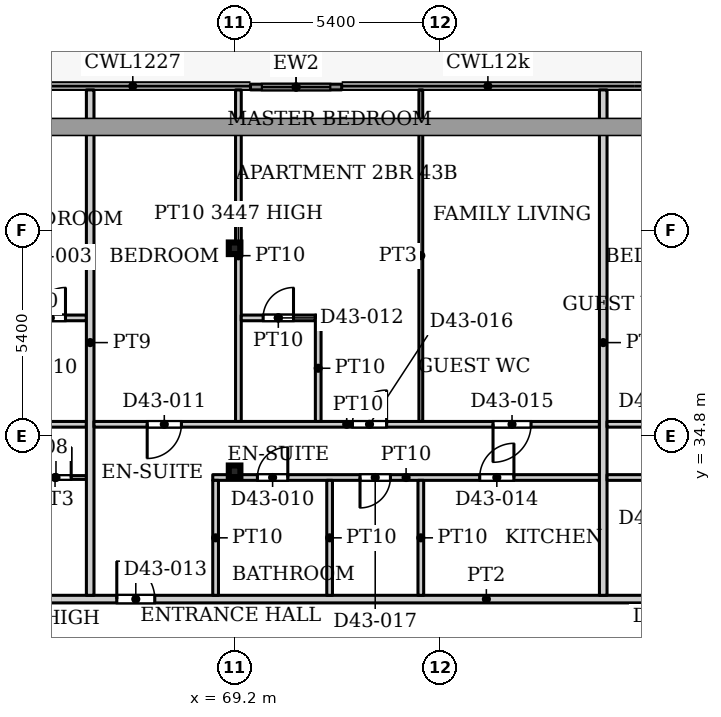
"""IFC4 building model, lengths in metres.
Left out: names, types, materials, properties, quantities, classifications, styles, units other than length and angle.
Written with IfcOpenShell. Run it as: python <this file> out.ifc"""

import sys

from ifc_helpers import new_model, si_unit, direction, frame, frame_2d, origin, origin_2d, place, context, subcontext, project, spatial, rectangle, hollow_rectangle, extrude, source, transform, mapped, element, fill, save


model = new_model("IFC4")
c1 = context("Model", 3, precision=1e-05, world=origin(), true_north=direction((0.0, 1.0)))
c2 = subcontext(c1, "Body", "Model", "MODEL_VIEW")
j1 = project(units=[si_unit("LENGTHUNIT", "METRE"), si_unit("PLANEANGLEUNIT", "RADIAN")], contexts=[c1])
p1 = place(None, origin())
s1 = spatial("IfcSite", under=j1, at=p1, CompositionType="ELEMENT")
p2 = place(p1, origin())
s2 = spatial("IfcBuilding", under=s1, at=p2, CompositionType="ELEMENT")
p3 = place(p2, frame((0.0, 0.0, 183.8)))
s3 = spatial("IfcBuildingStorey", under=s2, at=p3, CompositionType="ELEMENT", Elevation=183.8)
for number, where, z_axis, x_axis in (
    (1, (69.2, 33.863, 0.0), (0.0, 0.0, 1.0), (1.0, 0.0, 0.0)),
    (2, (69.2, 39.732, 0.0), (0.0, 0.0, 1.0), (1.0, 0.0, 0.0)),
):
    element("IfcColumn", number, at=place(p3, frame(where, z_axis=z_axis, x_axis=x_axis)), inside=s3, PredefinedType="COLUMN", context=c2, shape_type="SweptSolid", body=[
        extrude(hollow_rectangle(XDim=0.305, YDim=0.305, WallThickness=0.016, InnerFilletRadius=0.016, OuterFilletRadius=0.032, at=origin_2d()), origin(), (0.0, 0.0, 1.0), 3.9),
    ])
p4 = place(p3, frame((69.618, 43.975, 0.0), z_axis=(0.0, 0.0, 1.0), x_axis=(1.0, 0.0, 0.0)))
e3 = element("IfcWall", 3, at=p4, inside=s3, PredefinedType="SOLIDWALL", context=c2, shape_type="SweptSolid", body=[
    extrude(rectangle(XDim=2.4, YDim=0.15, at=frame_2d((1.2, 0.0))), origin(), (0.0, 0.0, 1.0), 3.75),
])
p5 = place(p4, frame((0.3, 0.0, 0.0)))
e4 = element("IfcOpeningElement", 4, at=p5, cuts=e3, PredefinedType="OPENING", context=c2, shape_type="SweptSolid", body=[
    extrude(rectangle(XDim=1.8, YDim=2.4, at=frame_2d((0.9, 1.2))), frame((0.0, 0.085, 0.0), z_axis=(0.0, -1.0, 0.0), x_axis=(1.0, 0.0, 0.0)), (0.0, 0.0, 1.0), 0.17),
])
p6 = place(p3, frame((53.549, 30.5, 0.0), z_axis=(0.0, 0.0, 1.0), x_axis=(1.0, 0.0, 0.0)))
e5 = element("IfcWall", 5, at=p6, inside=s3, PredefinedType="PARTITIONING", context=c2, shape_type="SweptSolid", body=[
    extrude(rectangle(XDim=44.551, YDim=0.2, at=frame_2d((22.275, 0.0))), origin(), (0.0, 0.0, 1.0), 3.6),
])
p7 = place(p6, frame((8.351, 0.0, 0.0)))
e6 = element("IfcOpeningElement", 6, at=p7, cuts=e5, PredefinedType="OPENING", context=c2, shape_type="SweptSolid", body=[
    extrude(rectangle(XDim=1.0, YDim=2.1, at=frame_2d((0.5, 1.05))), frame((0.0, 0.11, 0.0), z_axis=(0.0, -1.0, 0.0), x_axis=(1.0, 0.0, 0.0)), (0.0, 0.0, 1.0), 0.22),
])
p8 = place(p6, frame((12.551, 0.0, 0.0)))
e7 = element("IfcOpeningElement", 7, at=p8, cuts=e5, PredefinedType="OPENING", context=c2, shape_type="SweptSolid", body=[
    extrude(rectangle(XDim=1.0, YDim=2.1, at=frame_2d((0.5, 1.05))), frame((0.0, 0.11, 0.0), z_axis=(0.0, -1.0, 0.0), x_axis=(1.0, 0.0, 0.0)), (0.0, 0.0, 1.0), 0.22),
])
p9 = place(p6, frame((28.751, 0.0, 0.0)))
e8 = element("IfcOpeningElement", 8, at=p9, cuts=e5, PredefinedType="OPENING", context=c2, shape_type="SweptSolid", body=[
    extrude(rectangle(XDim=1.0, YDim=2.1, at=frame_2d((0.5, 1.05))), frame((0.0, 0.11, 0.0), z_axis=(0.0, -1.0, 0.0), x_axis=(1.0, 0.0, 0.0)), (0.0, 0.0, 1.0), 0.22),
])
p10 = place(p6, frame((40.751, 0.0, 0.0)))
e9 = element("IfcOpeningElement", 9, at=p10, cuts=e5, PredefinedType="OPENING", context=c2, shape_type="SweptSolid", body=[
    extrude(rectangle(XDim=1.0, YDim=2.1, at=frame_2d((0.5, 1.05))), frame((0.0, 0.11, 0.0), z_axis=(0.0, -1.0, 0.0), x_axis=(1.0, 0.0, 0.0)), (0.0, 0.0, 1.0), 0.22),
])
p11 = place(p3, frame((53.549, 35.1, 0.0), z_axis=(0.0, 0.0, 1.0), x_axis=(1.0, 0.0, 0.0)))
e10 = element("IfcWall", 10, at=p11, inside=s3, PredefinedType="PARTITIONING", context=c2, shape_type="SweptSolid", body=[
    extrude(rectangle(XDim=11.751, YDim=0.15, at=frame_2d((5.875, 0.0))), origin(), (0.0, 0.0, 1.0), 3.6),
])
p12 = place(p11, frame((5.551, 0.0, 0.0)))
e11 = element("IfcOpeningElement", 11, at=p12, cuts=e10, PredefinedType="OPENING", context=c2, shape_type="SweptSolid", body=[
    extrude(rectangle(XDim=0.9, YDim=2.1, at=frame_2d((0.45, 1.05))), frame((0.0, 0.085, 0.0), z_axis=(0.0, -1.0, 0.0), x_axis=(1.0, 0.0, 0.0)), (0.0, 0.0, 1.0), 0.17),
])
p13 = place(p11, frame((1.751, 0.0, 0.0)))
e12 = element("IfcOpeningElement", 12, at=p13, cuts=e10, PredefinedType="OPENING", context=c2, shape_type="SweptSolid", body=[
    extrude(rectangle(XDim=1.0, YDim=2.1, at=frame_2d((0.5, 1.05))), frame((0.0, 0.085, 0.0), z_axis=(0.0, -1.0, 0.0), x_axis=(1.0, 0.0, 0.0)), (0.0, 0.0, 1.0), 0.17),
])
p14 = place(p11, frame((8.101, 0.0, 0.0)))
e13 = element("IfcOpeningElement", 13, at=p14, cuts=e10, PredefinedType="OPENING", context=c2, shape_type="SweptSolid", body=[
    extrude(rectangle(XDim=0.9, YDim=2.1, at=frame_2d((0.45, 1.05))), frame((0.0, 0.085, 0.0), z_axis=(0.0, -1.0, 0.0), x_axis=(1.0, 0.0, 0.0)), (0.0, 0.0, 1.0), 0.17),
])
p15 = place(p3, frame((63.375, 37.9, 0.0), z_axis=(0.0, 0.0, 1.0), x_axis=(1.0, 0.0, 0.0)))
e14 = element("IfcWall", 14, at=p15, inside=s3, PredefinedType="PARTITIONING", context=c2, shape_type="SweptSolid", body=[
    extrude(rectangle(XDim=1.925, YDim=0.15, at=frame_2d((0.962, 0.0))), origin(), (0.0, 0.0, 1.0), 3.6),
])
p16 = place(p15, frame((0.575, 0.0, 0.0)))
e15 = element("IfcOpeningElement", 15, at=p16, cuts=e14, PredefinedType="OPENING", context=c2, shape_type="SweptSolid", body=[
    extrude(rectangle(XDim=0.8, YDim=2.1, at=frame_2d((0.4, 1.05))), frame((0.0, 0.085, 0.0), z_axis=(0.0, -1.0, 0.0), x_axis=(1.0, 0.0, 0.0)), (0.0, 0.0, 1.0), 0.17),
])
p17 = place(p3, frame((63.65, 33.7, 0.0), z_axis=(0.0, 0.0, 1.0), x_axis=(1.0, 0.0, 0.0)))
e16 = element("IfcWall", 16, at=p17, inside=s3, PredefinedType="PARTITIONING", context=c2, shape_type="SweptSolid", body=[
    extrude(rectangle(XDim=1.65, YDim=0.1, at=frame_2d((0.825, 0.0))), origin(), (0.0, 0.0, 1.0), 3.6),
])
p18 = place(p17, frame((0.45, 0.0, 0.0)))
e17 = element("IfcOpeningElement", 17, at=p18, cuts=e16, PredefinedType="OPENING", context=c2, shape_type="SweptSolid", body=[
    extrude(rectangle(XDim=0.8, YDim=2.1, at=frame_2d((0.4, 1.05))), frame((0.0, 0.06, 0.0), z_axis=(0.0, -1.0, 0.0), x_axis=(1.0, 0.0, 0.0)), (0.0, 0.0, 1.0), 0.12),
])
p19 = place(p3, frame((65.4, 30.6, 0.0), z_axis=(0.0, 0.0, 1.0), x_axis=(0.0, 1.0, 0.0)))
e18 = element("IfcWall", 18, at=p19, inside=s3, PredefinedType="PARTITIONING", context=c2, shape_type="SweptSolid", body=[
    extrude(rectangle(XDim=13.3, YDim=0.2, at=frame_2d((6.65, 0.0))), origin(), (0.0, 0.0, 1.0), 3.6),
])
p20 = place(p3, frame((65.5, 35.1, 0.0), z_axis=(0.0, 0.0, 1.0), x_axis=(1.0, 0.0, 0.0)))
e19 = element("IfcWall", 19, at=p20, inside=s3, PredefinedType="PARTITIONING", context=c2, shape_type="SweptSolid", body=[
    extrude(rectangle(XDim=13.3, YDim=0.15, at=frame_2d((6.65, 0.0))), origin(), (0.0, 0.0, 1.0), 3.6),
])
p21 = place(p20, frame((1.4, 0.0, 0.0)))
e20 = element("IfcOpeningElement", 20, at=p21, cuts=e19, PredefinedType="OPENING", context=c2, shape_type="SweptSolid", body=[
    extrude(rectangle(XDim=0.9, YDim=2.1, at=frame_2d((0.45, 1.05))), frame((0.0, 0.085, 0.0), z_axis=(0.0, -1.0, 0.0), x_axis=(1.0, 0.0, 0.0)), (0.0, 0.0, 1.0), 0.17),
])
p22 = place(p20, frame((10.5, 0.0, 0.0)))
e21 = element("IfcOpeningElement", 21, at=p22, cuts=e19, PredefinedType="OPENING", context=c2, shape_type="SweptSolid", body=[
    extrude(rectangle(XDim=1.0, YDim=2.1, at=frame_2d((0.5, 1.05))), frame((0.0, 0.085, 0.0), z_axis=(0.0, -1.0, 0.0), x_axis=(1.0, 0.0, 0.0)), (0.0, 0.0, 1.0), 0.17),
])
p23 = place(p20, frame((6.8, 0.0, 0.0)))
e22 = element("IfcOpeningElement", 22, at=p23, cuts=e19, PredefinedType="OPENING", context=c2, shape_type="SweptSolid", body=[
    extrude(rectangle(XDim=0.9, YDim=2.1, at=frame_2d((0.45, 1.05))), frame((0.0, 0.085, 0.0), z_axis=(0.0, -1.0, 0.0), x_axis=(1.0, 0.0, 0.0)), (0.0, 0.0, 1.0), 0.17),
])
p24 = place(p3, frame((68.625, 33.7, 0.0), z_axis=(0.0, 0.0, 1.0), x_axis=(1.0, 0.0, 0.0)))
e23 = element("IfcWall", 23, at=p24, inside=s3, PredefinedType="PARTITIONING", context=c2, shape_type="SweptSolid", body=[
    extrude(rectangle(XDim=10.175, YDim=0.15, at=frame_2d((5.087, 0.0))), origin(), (0.0, 0.0, 1.0), 3.6),
])
p25 = place(p24, frame((1.175, 0.0, 0.0)))
e24 = element("IfcOpeningElement", 24, at=p25, cuts=e23, PredefinedType="OPENING", context=c2, shape_type="SweptSolid", body=[
    extrude(rectangle(XDim=0.8, YDim=2.1, at=frame_2d((0.4, 1.05))), frame((0.0, 0.085, 0.0), z_axis=(0.0, -1.0, 0.0), x_axis=(1.0, 0.0, 0.0)), (0.0, 0.0, 1.0), 0.17),
])
p26 = place(p24, frame((7.025, 0.0, 0.0)))
e25 = element("IfcOpeningElement", 25, at=p26, cuts=e23, PredefinedType="OPENING", context=c2, shape_type="SweptSolid", body=[
    extrude(rectangle(XDim=0.9, YDim=2.1, at=frame_2d((0.45, 1.05))), frame((0.0, 0.085, 0.0), z_axis=(0.0, -1.0, 0.0), x_axis=(1.0, 0.0, 0.0)), (0.0, 0.0, 1.0), 0.17),
])
p27 = place(p24, frame((3.875, 0.0, 0.0)))
e26 = element("IfcOpeningElement", 26, at=p27, cuts=e23, PredefinedType="OPENING", context=c2, shape_type="SweptSolid", body=[
    extrude(rectangle(XDim=0.8, YDim=2.1, at=frame_2d((0.4, 1.05))), frame((0.0, 0.085, 0.0), z_axis=(0.0, -1.0, 0.0), x_axis=(1.0, 0.0, 0.0)), (0.0, 0.0, 1.0), 0.17),
])
p28 = place(p3, frame((68.7, 30.6, 0.0), z_axis=(0.0, 0.0, 1.0), x_axis=(0.0, 1.0, 0.0)))
e27 = element("IfcWall", 27, at=p28, inside=s3, PredefinedType="PARTITIONING", context=c2, shape_type="SweptSolid", body=[
    extrude(rectangle(XDim=3.025, YDim=0.15, at=frame_2d((1.512, 0.0))), origin(), (0.0, 0.0, 1.0), 3.6),
])
p29 = place(p3, frame((69.3, 35.175, 0.0), z_axis=(0.0, 0.0, 1.0), x_axis=(0.0, 1.0, 0.0)))
e28 = element("IfcWall", 28, at=p29, inside=s3, PredefinedType="PARTITIONING", context=c2, shape_type="SweptSolid", body=[
    extrude(rectangle(XDim=8.725, YDim=0.15, at=frame_2d((4.362, 0.0))), origin(), (0.0, 0.0, 1.0), 3.447),
])
p30 = place(p3, frame((69.375, 37.9, 0.0), z_axis=(0.0, 0.0, 1.0), x_axis=(1.0, 0.0, 0.0)))
e29 = element("IfcWall", 29, at=p30, inside=s3, PredefinedType="PARTITIONING", context=c2, shape_type="SweptSolid", body=[
    extrude(rectangle(XDim=1.95, YDim=0.15, at=frame_2d((0.975, 0.0))), origin(), (0.0, 0.0, 1.0), 3.6),
])
p31 = place(p30, frame((0.575, 0.0, 0.0)))
e30 = element("IfcOpeningElement", 30, at=p31, cuts=e29, PredefinedType="OPENING", context=c2, shape_type="SweptSolid", body=[
    extrude(rectangle(XDim=0.8, YDim=2.1, at=frame_2d((0.4, 1.05))), frame((0.0, 0.085, 0.0), z_axis=(0.0, -1.0, 0.0), x_axis=(1.0, 0.0, 0.0)), (0.0, 0.0, 1.0), 0.17),
])
p32 = place(p3, frame((71.4, 35.175, 0.0), z_axis=(0.0, 0.0, 1.0), x_axis=(0.0, 1.0, 0.0)))
e31 = element("IfcWall", 31, at=p32, inside=s3, PredefinedType="PARTITIONING", context=c2, shape_type="SweptSolid", body=[
    extrude(rectangle(XDim=2.8, YDim=0.15, at=frame_2d((1.4, 0.0))), origin(), (0.0, 0.0, 1.0), 3.6),
])
for number, where, z_axis, x_axis in (
    (32, (71.7, 30.6, 0.0), (0.0, 0.0, 1.0), (0.0, 1.0, 0.0)),
    (33, (74.1, 30.6, 0.0), (0.0, 0.0, 1.0), (0.0, 1.0, 0.0)),
):
    element("IfcWall", number, at=place(p3, frame(where, z_axis=z_axis, x_axis=x_axis)), inside=s3, PredefinedType="PARTITIONING", context=c2, shape_type="SweptSolid", body=[
        extrude(rectangle(XDim=3.025, YDim=0.15, at=frame_2d((1.512, 0.0))), origin(), (0.0, 0.0, 1.0), 3.6),
    ])
p33 = place(p3, frame((74.1, 35.175, 0.0), z_axis=(0.0, 0.0, 1.0), x_axis=(0.0, 1.0, 0.0)))
e34 = element("IfcWall", 34, at=p33, inside=s3, PredefinedType="PARTITIONING", context=c2, shape_type="SweptSolid", body=[
    extrude(rectangle(XDim=8.725, YDim=0.1, at=frame_2d((4.362, 0.0))), origin(), (0.0, 0.0, 1.0), 3.6),
])
p34 = place(p3, frame((78.9, 30.6, 0.0), z_axis=(0.0, 0.0, 1.0), x_axis=(0.0, 1.0, 0.0)))
e35 = element("IfcWall", 35, at=p34, inside=s3, PredefinedType="PARTITIONING", context=c2, shape_type="SweptSolid", body=[
    extrude(rectangle(XDim=13.3, YDim=0.2, at=frame_2d((6.65, 0.0))), origin(), (0.0, 0.0, 1.0), 3.6),
])
p35 = place(p3, frame((79.0, 33.7, 0.0), z_axis=(0.0, 0.0, 1.0), x_axis=(1.0, 0.0, 0.0)))
e36 = element("IfcWall", 36, at=p35, inside=s3, PredefinedType="PARTITIONING", context=c2, shape_type="SweptSolid", body=[
    extrude(rectangle(XDim=2.95, YDim=0.15, at=frame_2d((1.475, 0.0))), origin(), (0.0, 0.0, 1.0), 3.6),
])
p36 = place(p35, frame((0.95, 0.0, 0.0)))
e37 = element("IfcOpeningElement", 37, at=p36, cuts=e36, PredefinedType="OPENING", context=c2, shape_type="SweptSolid", body=[
    extrude(rectangle(XDim=0.9, YDim=2.1, at=frame_2d((0.45, 1.05))), frame((0.0, 0.085, 0.0), z_axis=(0.0, -1.0, 0.0), x_axis=(1.0, 0.0, 0.0)), (0.0, 0.0, 1.0), 0.17),
])
p37 = place(p3, frame((79.0, 35.1, 0.0), z_axis=(0.0, 0.0, 1.0), x_axis=(1.0, 0.0, 0.0)))
e38 = element("IfcWall", 38, at=p37, inside=s3, PredefinedType="PARTITIONING", context=c2, shape_type="SweptSolid", body=[
    extrude(rectangle(XDim=11.5, YDim=0.15, at=frame_2d((5.75, 0.0))), origin(), (0.0, 0.0, 1.0), 3.6),
])
p38 = place(p37, frame((0.95, 0.0, 0.0)))
e39 = element("IfcOpeningElement", 39, at=p38, cuts=e38, PredefinedType="OPENING", context=c2, shape_type="SweptSolid", body=[
    extrude(rectangle(XDim=0.9, YDim=2.1, at=frame_2d((0.45, 1.05))), frame((0.0, 0.085, 0.0), z_axis=(0.0, -1.0, 0.0), x_axis=(1.0, 0.0, 0.0)), (0.0, 0.0, 1.0), 0.17),
])
p39 = place(p37, frame((4.35, 0.0, 0.0)))
e40 = element("IfcOpeningElement", 40, at=p39, cuts=e38, PredefinedType="OPENING", context=c2, shape_type="SweptSolid", body=[
    extrude(rectangle(XDim=1.0, YDim=2.1, at=frame_2d((0.5, 1.05))), frame((0.0, 0.085, 0.0), z_axis=(0.0, -1.0, 0.0), x_axis=(1.0, 0.0, 0.0)), (0.0, 0.0, 1.0), 0.17),
])
p40 = place(p37, frame((9.8, 0.0, 0.0)))
e41 = element("IfcOpeningElement", 41, at=p40, cuts=e38, PredefinedType="OPENING", context=c2, shape_type="SweptSolid", body=[
    extrude(rectangle(XDim=0.9, YDim=2.1, at=frame_2d((0.45, 1.05))), frame((0.0, 0.085, 0.0), z_axis=(0.0, -1.0, 0.0), x_axis=(1.0, 0.0, 0.0)), (0.0, 0.0, 1.0), 0.17),
])
m1 = source(origin(), c2, "Body", "SweptSolid", [
    extrude(rectangle(XDim=1.8, YDim=2.4, at=frame_2d((0.9, 1.2))), frame((0.0, 0.025, 0.0), z_axis=(0.0, -1.0, 0.0), x_axis=(1.0, 0.0, 0.0)), (0.0, 0.0, 1.0), 0.05),
])
p41 = place(p5, origin())
e42 = element("IfcDoor", 42, at=p41, inside=s3, OperationType="SLIDING_TO_LEFT", PredefinedType="DOOR", context=c2, shape_type="MappedRepresentation", body=[
    mapped(m1, transform((0.0, 0.0, 0.0), x_axis=(1.0, 0.0, 0.0), y_axis=(0.0, 1.0, 0.0), z_axis=(0.0, 0.0, 1.0), scale=1.0)),
])
fill(e4, e42)
m2 = source(origin(), c2, "Body", "SweptSolid", [
    extrude(rectangle(XDim=0.8, YDim=2.1, at=frame_2d((0.4, 1.05))), frame((0.0, 0.025, 0.0), z_axis=(0.0, -1.0, 0.0), x_axis=(1.0, 0.0, 0.0)), (0.0, 0.0, 1.0), 0.05),
])
p42 = place(p16, origin())
e43 = element("IfcDoor", 43, at=p42, inside=s3, OperationType="SINGLE_SWING_LEFT", PredefinedType="DOOR", context=c2, shape_type="MappedRepresentation", body=[
    mapped(m2, transform((0.0, 0.0, 0.0), x_axis=(1.0, 0.0, 0.0), y_axis=(0.0, 1.0, 0.0), z_axis=(0.0, 0.0, 1.0), scale=1.0)),
])
fill(e15, e43)
p43 = place(p18, origin())
e44 = element("IfcDoor", 44, at=p43, inside=s3, OperationType="SINGLE_SWING_LEFT", PredefinedType="DOOR", context=c2, shape_type="MappedRepresentation", body=[
    mapped(m2, transform((0.0, 0.0, 0.0), x_axis=(1.0, 0.0, 0.0), y_axis=(0.0, 1.0, 0.0), z_axis=(0.0, 0.0, 1.0), scale=1.0)),
])
fill(e17, e44)
p44 = place(p25, origin())
e45 = element("IfcDoor", 45, at=p44, inside=s3, OperationType="SINGLE_SWING_LEFT", PredefinedType="DOOR", context=c2, shape_type="MappedRepresentation", body=[
    mapped(m2, transform((0.0, 0.0, 0.0), x_axis=(1.0, 0.0, 0.0), y_axis=(0.0, 1.0, 0.0), z_axis=(0.0, 0.0, 1.0), scale=1.0)),
])
fill(e24, e45)
m3 = source(origin(), c2, "Body", "SweptSolid", [
    extrude(rectangle(XDim=0.9, YDim=2.1, at=frame_2d((0.45, 1.05))), frame((0.0, 0.025, 0.0), z_axis=(0.0, -1.0, 0.0), x_axis=(1.0, 0.0, 0.0)), (0.0, 0.0, 1.0), 0.05),
])
p45 = place(p21, origin())
e46 = element("IfcDoor", 46, at=p45, inside=s3, OperationType="SINGLE_SWING_RIGHT", PredefinedType="DOOR", context=c2, shape_type="MappedRepresentation", body=[
    mapped(m3, transform((0.0, 0.0, 0.0), x_axis=(1.0, 0.0, 0.0), y_axis=(0.0, 1.0, 0.0), z_axis=(0.0, 0.0, 1.0), scale=1.0)),
])
fill(e20, e46)
p46 = place(p31, origin())
e47 = element("IfcDoor", 47, at=p46, inside=s3, OperationType="SINGLE_SWING_LEFT", PredefinedType="DOOR", context=c2, shape_type="MappedRepresentation", body=[
    mapped(m2, transform((0.0, 0.0, 0.0), x_axis=(1.0, 0.0, 0.0), y_axis=(0.0, 1.0, 0.0), z_axis=(0.0, 0.0, 1.0), scale=1.0)),
])
fill(e30, e47)
m4 = source(origin(), c2, "Body", "SweptSolid", [
    extrude(rectangle(XDim=1.0, YDim=2.1, at=frame_2d((0.5, 1.05))), frame((0.0, 0.025, 0.0), z_axis=(0.0, -1.0, 0.0), x_axis=(1.0, 0.0, 0.0)), (0.0, 0.0, 1.0), 0.05),
])
p47 = place(p8, origin())
e48 = element("IfcDoor", 48, at=p47, inside=s3, OperationType="SINGLE_SWING_LEFT", PredefinedType="DOOR", context=c2, shape_type="MappedRepresentation", body=[
    mapped(m4, transform((0.0, 0.0, 0.0), x_axis=(1.0, 0.0, 0.0), y_axis=(0.0, 1.0, 0.0), z_axis=(0.0, 0.0, 1.0), scale=1.0)),
])
fill(e7, e48)
p48 = place(p26, origin())
e49 = element("IfcDoor", 49, at=p48, inside=s3, OperationType="SINGLE_SWING_LEFT", PredefinedType="DOOR", context=c2, shape_type="MappedRepresentation", body=[
    mapped(m3, transform((0.0, 0.0, 0.0), x_axis=(1.0, 0.0, 0.0), y_axis=(0.0, 1.0, 0.0), z_axis=(0.0, 0.0, 1.0), scale=1.0)),
])
fill(e25, e49)
m5 = source(origin(), c2, "Body", "SweptSolid", [
    extrude(rectangle(XDim=1.0, YDim=2.1, at=frame_2d((0.5, 1.05))), frame((0.0, 0.025, 0.0), z_axis=(0.0, -1.0, 0.0), x_axis=(1.0, 0.0, 0.0)), (0.0, 0.0, 1.0), 0.05),
])
p49 = place(p22, origin())
e50 = element("IfcDoor", 50, at=p49, inside=s3, OperationType="SINGLE_SWING_RIGHT", PredefinedType="DOOR", context=c2, shape_type="MappedRepresentation", body=[
    mapped(m5, transform((0.0, 0.0, 0.0), x_axis=(1.0, 0.0, 0.0), y_axis=(0.0, 1.0, 0.0), z_axis=(0.0, 0.0, 1.0), scale=1.0)),
])
fill(e21, e50)
p50 = place(p23, origin())
e51 = element("IfcDoor", 51, at=p50, inside=s3, OperationType="SINGLE_SWING_LEFT", PredefinedType="DOOR", context=c2, shape_type="MappedRepresentation", body=[
    mapped(m3, transform((0.0, 0.0, 0.0), x_axis=(1.0, 0.0, 0.0), y_axis=(0.0, 1.0, 0.0), z_axis=(0.0, 0.0, 1.0), scale=1.0)),
])
fill(e22, e51)
p51 = place(p27, origin())
e52 = element("IfcDoor", 52, at=p51, inside=s3, OperationType="SINGLE_SWING_RIGHT", PredefinedType="DOOR", context=c2, shape_type="MappedRepresentation", body=[
    mapped(m2, transform((0.0, 0.0, 0.0), x_axis=(1.0, 0.0, 0.0), y_axis=(0.0, 1.0, 0.0), z_axis=(0.0, 0.0, 1.0), scale=1.0)),
])
fill(e26, e52)
save(model, sys.argv[1])
